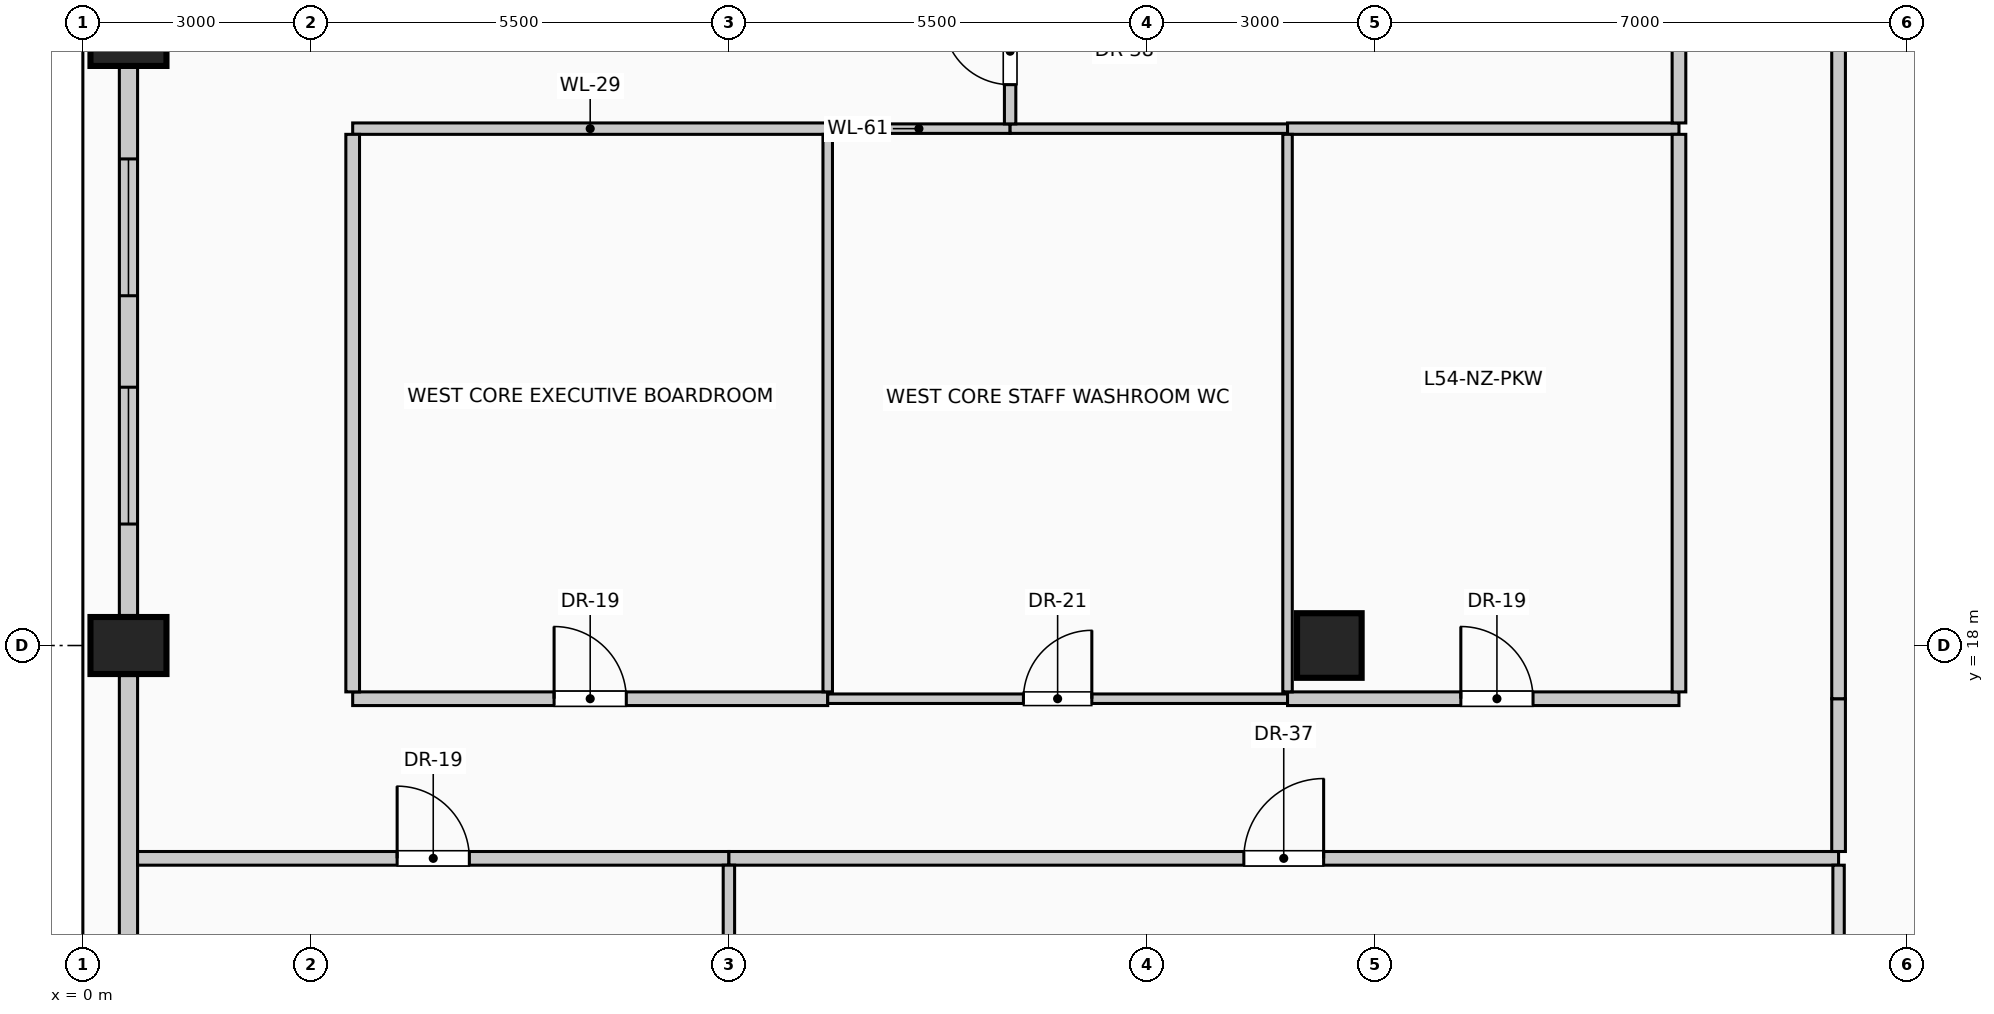
"""IFC4 building model, lengths in metres.
Left out: names, types, materials, properties, quantities, classifications, styles, units other than length and angle.
Written with IfcOpenShell. Run it as: python <this file> out.ifc"""

import sys

from ifc_helpers import new_model, si_unit, direction, frame, frame_2d, origin, origin_2d, place, context, subcontext, project, spatial, rectangle, circle, extrude, element, fill, save


model = new_model("IFC4")
c1 = context("Model", 3, precision=1e-05, world=origin(), true_north=direction((0.0, 1.0)))
c2 = subcontext(c1, "Body", "Model", "MODEL_VIEW")
j1 = project(units=[si_unit("LENGTHUNIT", "METRE"), si_unit("PLANEANGLEUNIT", "RADIAN")], contexts=[c1])
p1 = place(None, origin())
s1 = spatial("IfcSite", under=j1, at=p1, CompositionType="ELEMENT")
p2 = place(p1, origin())
s2 = spatial("IfcBuilding", under=s1, at=p2, CompositionType="ELEMENT")
p3 = place(p2, frame((0.0, 0.0, 222.6)))
s3 = spatial("IfcBuildingStorey", under=s2, at=p3, CompositionType="ELEMENT", Elevation=222.6)
for number, where, z_axis, x_axis in (
    (1, (0.6, 18.0, 0.0), (0.0, 0.0, 1.0), (0.0, 1.0, 0.0)),
    (2, (0.6, 26.0, 0.0), (0.0, 0.0, 1.0), (0.0, 1.0, 0.0)),
):
    element("IfcColumn", number, at=place(p3, frame(where, z_axis=z_axis, x_axis=x_axis)), inside=s3, PredefinedType="COLUMN", context=c2, shape_type="SweptSolid", body=[
        extrude(rectangle(XDim=0.75, YDim=1.0, at=origin_2d()), origin(), (0.0, 0.0, 1.0), 4.0),
    ])
p4 = place(p3, frame((16.4, 18.0, 0.0), z_axis=(0.0, 0.0, 1.0), x_axis=(1.0, 0.0, 0.0)))
e3 = element("IfcColumn", 3, at=p4, inside=s3, PredefinedType="COLUMN", context=c2, shape_type="SweptSolid", body=[
    extrude(circle(Radius=0.425, at=origin_2d()), origin(), (0.0, 0.0, 1.0), 4.0),
])
p5 = place(p3, frame((0.6, 10.395, 0.0), z_axis=(0.0, 0.0, 1.0), x_axis=(0.0, 1.0, 0.0)))
e4 = element("IfcWall", 4, at=p5, inside=s3, PredefinedType="SOLIDWALL", context=c2, shape_type="SweptSolid", body=[
    extrude(rectangle(XDim=7.21, YDim=0.24, at=frame_2d((3.605, 0.0))), origin(), (0.0, 0.0, 1.0), 3.0),
])
p6 = place(p5, frame((1.203, 0.0, 0.42)))
e5 = element("IfcOpeningElement", 5, at=p6, cuts=e4, PredefinedType="OPENING", context=c2, shape_type="SweptSolid", body=[
    extrude(rectangle(XDim=1.8, YDim=2.2, at=frame_2d((0.9, 1.1))), frame((0.0, 0.13, 0.0), z_axis=(0.0, -1.0, 0.0), x_axis=(1.0, 0.0, 0.0)), (0.0, 0.0, 1.0), 0.26),
])
p7 = place(p3, frame((0.6, 18.395, 0.0), z_axis=(0.0, 0.0, 1.0), x_axis=(0.0, 1.0, 0.0)))
e6 = element("IfcWall", 6, at=p7, inside=s3, PredefinedType="SOLIDWALL", context=c2, shape_type="SweptSolid", body=[
    extrude(rectangle(XDim=7.21, YDim=0.24, at=frame_2d((3.605, 0.0))), origin(), (0.0, 0.0, 1.0), 3.0),
])
p8 = place(p7, frame((1.203, 0.0, 0.42)))
e7 = element("IfcOpeningElement", 7, at=p8, cuts=e6, PredefinedType="OPENING", context=c2, shape_type="SweptSolid", body=[
    extrude(rectangle(XDim=1.8, YDim=2.2, at=frame_2d((0.9, 1.1))), frame((0.0, 0.13, 0.0), z_axis=(0.0, -1.0, 0.0), x_axis=(1.0, 0.0, 0.0)), (0.0, 0.0, 1.0), 0.26),
])
p9 = place(p7, frame((4.207, 0.0, 0.42)))
e8 = element("IfcOpeningElement", 8, at=p9, cuts=e6, PredefinedType="OPENING", context=c2, shape_type="SweptSolid", body=[
    extrude(rectangle(XDim=1.8, YDim=2.2, at=frame_2d((0.9, 1.1))), frame((0.0, 0.13, 0.0), z_axis=(0.0, -1.0, 0.0), x_axis=(1.0, 0.0, 0.0)), (0.0, 0.0, 1.0), 0.26),
])
p10 = place(p3, frame((0.72, 15.2, 0.0), z_axis=(0.0, 0.0, 1.0), x_axis=(1.0, 0.0, 0.0)))
e9 = element("IfcWall", 9, at=p10, inside=s3, PredefinedType="PARTITIONING", context=c2, shape_type="SweptSolid", body=[
    extrude(rectangle(XDim=7.78, YDim=0.18, at=frame_2d((3.89, 0.0))), origin(), (0.0, 0.0, 1.0), 3.75),
])
p11 = place(p10, frame((3.415, 0.0, 0.0)))
e10 = element("IfcOpeningElement", 10, at=p11, cuts=e9, PredefinedType="OPENING", context=c2, shape_type="SweptSolid", body=[
    extrude(rectangle(XDim=0.95, YDim=2.15, at=frame_2d((0.475, 1.075))), frame((0.0, 0.1, 0.0), z_axis=(0.0, -1.0, 0.0), x_axis=(1.0, 0.0, 0.0)), (0.0, 0.0, 1.0), 0.2),
])
p12 = place(p3, frame((8.5, 15.2, 0.0), z_axis=(0.0, 0.0, 1.0), x_axis=(1.0, 0.0, 0.0)))
e11 = element("IfcWall", 11, at=p12, inside=s3, PredefinedType="PARTITIONING", context=c2, shape_type="SweptSolid", body=[
    extrude(rectangle(XDim=14.6, YDim=0.18, at=frame_2d((7.3, 0.0))), origin(), (0.0, 0.0, 1.0), 3.75),
])
p13 = place(p12, frame((6.775, 0.0, 0.0)))
e12 = element("IfcOpeningElement", 12, at=p13, cuts=e11, PredefinedType="OPENING", context=c2, shape_type="SweptSolid", body=[
    extrude(rectangle(XDim=1.05, YDim=2.15, at=frame_2d((0.525, 1.075))), frame((0.0, 0.1, 0.0), z_axis=(0.0, -1.0, 0.0), x_axis=(1.0, 0.0, 0.0)), (0.0, 0.0, 1.0), 0.2),
])
p14 = place(p3, frame((3.55, 17.3, 0.0), z_axis=(0.0, 0.0, 1.0), x_axis=(1.0, 0.0, 0.0)))
e13 = element("IfcWall", 13, at=p14, inside=s3, PredefinedType="PARTITIONING", context=c2, shape_type="SweptSolid", body=[
    extrude(rectangle(XDim=6.25, YDim=0.18, at=frame_2d((3.125, 0.0))), origin(), (0.0, 0.0, 1.0), 3.75),
])
p15 = place(p14, frame((2.65, 0.0, 0.0)))
e14 = element("IfcOpeningElement", 14, at=p15, cuts=e13, PredefinedType="OPENING", context=c2, shape_type="SweptSolid", body=[
    extrude(rectangle(XDim=0.95, YDim=2.15, at=frame_2d((0.475, 1.075))), frame((0.0, 0.1, 0.0), z_axis=(0.0, -1.0, 0.0), x_axis=(1.0, 0.0, 0.0)), (0.0, 0.0, 1.0), 0.2),
])
p16 = place(p3, frame((9.8, 17.3, 0.0), z_axis=(0.0, 0.0, 1.0), x_axis=(1.0, 0.0, 0.0)))
e15 = element("IfcWall", 15, at=p16, inside=s3, PredefinedType="PARTITIONING", context=c2, shape_type="SweptSolid", body=[
    extrude(rectangle(XDim=6.05, YDim=0.125, at=frame_2d((3.025, 0.0))), origin(), (0.0, 0.0, 1.0), 3.75),
])
p17 = place(p16, frame((2.575, 0.0, 0.0)))
e16 = element("IfcOpeningElement", 16, at=p17, cuts=e15, PredefinedType="OPENING", context=c2, shape_type="SweptSolid", body=[
    extrude(rectangle(XDim=0.9, YDim=2.1, at=frame_2d((0.45, 1.05))), frame((0.0, 0.073, 0.0), z_axis=(0.0, -1.0, 0.0), x_axis=(1.0, 0.0, 0.0)), (0.0, 0.0, 1.0), 0.145),
])
p18 = place(p3, frame((15.85, 17.3, 0.0), z_axis=(0.0, 0.0, 1.0), x_axis=(1.0, 0.0, 0.0)))
e17 = element("IfcWall", 17, at=p18, inside=s3, PredefinedType="PARTITIONING", context=c2, shape_type="SweptSolid", body=[
    extrude(rectangle(XDim=5.15, YDim=0.18, at=frame_2d((2.575, 0.0))), origin(), (0.0, 0.0, 1.0), 3.75),
])
p19 = place(p18, frame((2.28, 0.0, 0.0)))
e18 = element("IfcOpeningElement", 18, at=p19, cuts=e17, PredefinedType="OPENING", context=c2, shape_type="SweptSolid", body=[
    extrude(rectangle(XDim=0.95, YDim=2.15, at=frame_2d((0.475, 1.075))), frame((0.0, 0.1, 0.0), z_axis=(0.0, -1.0, 0.0), x_axis=(1.0, 0.0, 0.0)), (0.0, 0.0, 1.0), 0.2),
])
p20 = place(p3, frame((3.55, 24.8, 0.0), z_axis=(0.0, 0.0, 1.0), x_axis=(1.0, 0.0, 0.0)))
e19 = element("IfcWall", 19, at=p20, inside=s3, PredefinedType="PARTITIONING", context=c2, shape_type="SweptSolid", body=[
    extrude(rectangle(XDim=6.25, YDim=0.15, at=frame_2d((3.125, 0.0))), origin(), (0.0, 0.0, 1.0), 3.75),
])
p21 = place(p3, frame((9.8, 24.8, 0.0), z_axis=(0.0, 0.0, 1.0), x_axis=(1.0, 0.0, 0.0)))
e20 = element("IfcWall", 20, at=p21, inside=s3, PredefinedType="PARTITIONING", context=c2, shape_type="SweptSolid", body=[
    extrude(rectangle(XDim=2.4, YDim=0.125, at=frame_2d((1.2, 0.0))), origin(), (0.0, 0.0, 1.0), 3.75),
])
p22 = place(p3, frame((12.2, 24.8, 0.0), z_axis=(0.0, 0.0, 1.0), x_axis=(1.0, 0.0, 0.0)))
e21 = element("IfcWall", 21, at=p22, inside=s3, PredefinedType="PARTITIONING", context=c2, shape_type="SweptSolid", body=[
    extrude(rectangle(XDim=3.65, YDim=0.125, at=frame_2d((1.825, 0.0))), origin(), (0.0, 0.0, 1.0), 3.75),
])
p23 = place(p3, frame((15.85, 24.8, 0.0), z_axis=(0.0, 0.0, 1.0), x_axis=(1.0, 0.0, 0.0)))
e22 = element("IfcWall", 22, at=p23, inside=s3, PredefinedType="PARTITIONING", context=c2, shape_type="SweptSolid", body=[
    extrude(rectangle(XDim=5.15, YDim=0.15, at=frame_2d((2.575, 0.0))), origin(), (0.0, 0.0, 1.0), 3.75),
])
p24 = place(p3, frame((3.55, 17.39, 0.0), z_axis=(0.0, 0.0, 1.0), x_axis=(0.0, 1.0, 0.0)))
e23 = element("IfcWall", 23, at=p24, inside=s3, PredefinedType="PARTITIONING", context=c2, shape_type="SweptSolid", body=[
    extrude(rectangle(XDim=7.335, YDim=0.18, at=frame_2d((3.667, 0.0))), origin(), (0.0, 0.0, 1.0), 3.75),
])
p25 = place(p3, frame((8.5, 1.1, 0.0), z_axis=(0.0, 0.0, 1.0), x_axis=(0.0, 1.0, 0.0)))
e24 = element("IfcWall", 24, at=p25, inside=s3, PredefinedType="PARTITIONING", context=c2, shape_type="SweptSolid", body=[
    extrude(rectangle(XDim=14.01, YDim=0.15, at=frame_2d((7.005, 0.0))), origin(), (0.0, 0.0, 1.0), 3.75),
])
p26 = place(p3, frame((9.8, 17.39, 0.0), z_axis=(0.0, 0.0, 1.0), x_axis=(0.0, 1.0, 0.0)))
e25 = element("IfcWall", 25, at=p26, inside=s3, PredefinedType="PARTITIONING", context=c2, shape_type="SweptSolid", body=[
    extrude(rectangle(XDim=7.335, YDim=0.125, at=frame_2d((3.667, 0.0))), origin(), (0.0, 0.0, 1.0), 3.75),
])
p27 = place(p3, frame((12.2, 24.863, 0.0), z_axis=(0.0, 0.0, 1.0), x_axis=(0.0, 1.0, 0.0)))
e26 = element("IfcWall", 26, at=p27, inside=s3, PredefinedType="PARTITIONING", context=c2, shape_type="SweptSolid", body=[
    extrude(rectangle(XDim=1.912, YDim=0.15, at=frame_2d((0.956, 0.0))), origin(), (0.0, 0.0, 1.0), 3.75),
])
p28 = place(p27, frame((0.516, 0.0, 0.0)))
e27 = element("IfcOpeningElement", 27, at=p28, cuts=e26, PredefinedType="OPENING", context=c2, shape_type="SweptSolid", body=[
    extrude(rectangle(XDim=0.88, YDim=2.1, at=frame_2d((0.44, 1.05))), frame((0.0, 0.085, 0.0), z_axis=(0.0, -1.0, 0.0), x_axis=(1.0, 0.0, 0.0)), (0.0, 0.0, 1.0), 0.17),
])
p29 = place(p3, frame((15.85, 17.39, 0.0), z_axis=(0.0, 0.0, 1.0), x_axis=(0.0, 1.0, 0.0)))
e28 = element("IfcWall", 28, at=p29, inside=s3, PredefinedType="PARTITIONING", context=c2, shape_type="SweptSolid", body=[
    extrude(rectangle(XDim=7.335, YDim=0.125, at=frame_2d((3.667, 0.0))), origin(), (0.0, 0.0, 1.0), 3.75),
])
p30 = place(p3, frame((21.0, 17.39, 0.0), z_axis=(0.0, 0.0, 1.0), x_axis=(0.0, 1.0, 0.0)))
e29 = element("IfcWall", 29, at=p30, inside=s3, PredefinedType="PARTITIONING", context=c2, shape_type="SweptSolid", body=[
    extrude(rectangle(XDim=7.335, YDim=0.18, at=frame_2d((3.667, 0.0))), origin(), (0.0, 0.0, 1.0), 3.75),
])
p31 = place(p3, frame((21.0, 24.875, 0.0), z_axis=(0.0, 0.0, 1.0), x_axis=(0.0, 1.0, 0.0)))
e30 = element("IfcWall", 30, at=p31, inside=s3, PredefinedType="PARTITIONING", context=c2, shape_type="SweptSolid", body=[
    extrude(rectangle(XDim=1.9, YDim=0.18, at=frame_2d((0.95, 0.0))), origin(), (0.0, 0.0, 1.0), 3.75),
])
p32 = place(p3, frame((23.1, 0.72, 0.0), z_axis=(0.0, 0.0, 1.0), x_axis=(0.0, 1.0, 0.0)))
e31 = element("IfcWall", 31, at=p32, inside=s3, PredefinedType="PARTITIONING", context=c2, shape_type="SweptSolid", body=[
    extrude(rectangle(XDim=14.39, YDim=0.15, at=frame_2d((7.195, 0.0))), origin(), (0.0, 0.0, 1.0), 3.75),
])
p33 = place(p3, frame((23.1, 15.29, 0.0), z_axis=(0.0, 0.0, 1.0), x_axis=(0.0, 1.0, 0.0)))
e32 = element("IfcWall", 32, at=p33, inside=s3, PredefinedType="PARTITIONING", context=c2, shape_type="SweptSolid", body=[
    extrude(rectangle(XDim=2.01, YDim=0.18, at=frame_2d((1.005, 0.0))), origin(), (0.0, 0.0, 1.0), 3.75),
])
p34 = place(p3, frame((23.1, 17.3, 0.0), z_axis=(0.0, 0.0, 1.0), x_axis=(0.0, 1.0, 0.0)))
e33 = element("IfcWall", 33, at=p34, inside=s3, PredefinedType="PARTITIONING", context=c2, shape_type="SweptSolid", body=[
    extrude(rectangle(XDim=9.51, YDim=0.18, at=frame_2d((4.755, 0.0))), origin(), (0.0, 0.0, 1.0), 3.75),
])
p35 = place(p8, origin())
e34 = element("IfcWindow", 34, at=p35, inside=s3, PartitioningType="SINGLE_PANEL", PredefinedType="WINDOW", context=c2, shape_type="SweptSolid", body=[
    extrude(rectangle(XDim=1.8, YDim=2.2, at=frame_2d((0.9, 1.1))), frame((0.0, 0.03, 0.0), z_axis=(0.0, -1.0, 0.0), x_axis=(1.0, 0.0, 0.0)), (0.0, 0.0, 1.0), 0.06),
])
fill(e7, e34)
p36 = place(p9, origin())
e35 = element("IfcWindow", 35, at=p36, inside=s3, PartitioningType="SINGLE_PANEL", PredefinedType="WINDOW", context=c2, shape_type="SweptSolid", body=[
    extrude(rectangle(XDim=1.8, YDim=2.2, at=frame_2d((0.9, 1.1))), frame((0.0, 0.03, 0.0), z_axis=(0.0, -1.0, 0.0), x_axis=(1.0, 0.0, 0.0)), (0.0, 0.0, 1.0), 0.06),
])
fill(e8, e35)
p37 = place(p11, origin())
e36 = element("IfcDoor", 36, at=p37, inside=s3, OperationType="SINGLE_SWING_LEFT", PredefinedType="DOOR", context=c2, shape_type="SweptSolid", body=[
    extrude(rectangle(XDim=0.95, YDim=2.15, at=frame_2d((0.475, 1.075))), frame((0.0, 0.025, 0.0), z_axis=(0.0, -1.0, 0.0), x_axis=(1.0, 0.0, 0.0)), (0.0, 0.0, 1.0), 0.05),
])
fill(e10, e36)
p38 = place(p13, origin())
e37 = element("IfcDoor", 37, at=p38, inside=s3, OperationType="SINGLE_SWING_RIGHT", PredefinedType="DOOR", context=c2, shape_type="SweptSolid", body=[
    extrude(rectangle(XDim=1.05, YDim=2.15, at=frame_2d((0.525, 1.075))), frame((0.0, 0.025, 0.0), z_axis=(0.0, -1.0, 0.0), x_axis=(1.0, 0.0, 0.0)), (0.0, 0.0, 1.0), 0.05),
])
fill(e12, e37)
p39 = place(p15, origin())
e38 = element("IfcDoor", 38, at=p39, inside=s3, OperationType="SINGLE_SWING_LEFT", PredefinedType="DOOR", context=c2, shape_type="SweptSolid", body=[
    extrude(rectangle(XDim=0.95, YDim=2.15, at=frame_2d((0.475, 1.075))), frame((0.0, 0.025, 0.0), z_axis=(0.0, -1.0, 0.0), x_axis=(1.0, 0.0, 0.0)), (0.0, 0.0, 1.0), 0.05),
])
fill(e14, e38)
p40 = place(p17, origin())
e39 = element("IfcDoor", 39, at=p40, inside=s3, OperationType="SINGLE_SWING_RIGHT", PredefinedType="DOOR", context=c2, shape_type="SweptSolid", body=[
    extrude(rectangle(XDim=0.9, YDim=2.1, at=frame_2d((0.45, 1.05))), frame((0.0, 0.025, 0.0), z_axis=(0.0, -1.0, 0.0), x_axis=(1.0, 0.0, 0.0)), (0.0, 0.0, 1.0), 0.05),
])
fill(e16, e39)
p41 = place(p19, origin())
e40 = element("IfcDoor", 40, at=p41, inside=s3, OperationType="SINGLE_SWING_LEFT", PredefinedType="DOOR", context=c2, shape_type="SweptSolid", body=[
    extrude(rectangle(XDim=0.95, YDim=2.15, at=frame_2d((0.475, 1.075))), frame((0.0, 0.025, 0.0), z_axis=(0.0, -1.0, 0.0), x_axis=(1.0, 0.0, 0.0)), (0.0, 0.0, 1.0), 0.05),
])
fill(e18, e40)
p42 = place(p28, origin())
e41 = element("IfcDoor", 41, at=p42, inside=s3, OperationType="SINGLE_SWING_RIGHT", PredefinedType="DOOR", context=c2, shape_type="SweptSolid", body=[
    extrude(rectangle(XDim=0.88, YDim=2.1, at=frame_2d((0.44, 1.05))), frame((0.0, 0.025, 0.0), z_axis=(0.0, -1.0, 0.0), x_axis=(1.0, 0.0, 0.0)), (0.0, 0.0, 1.0), 0.05),
])
fill(e27, e41)
save(model, sys.argv[1])
